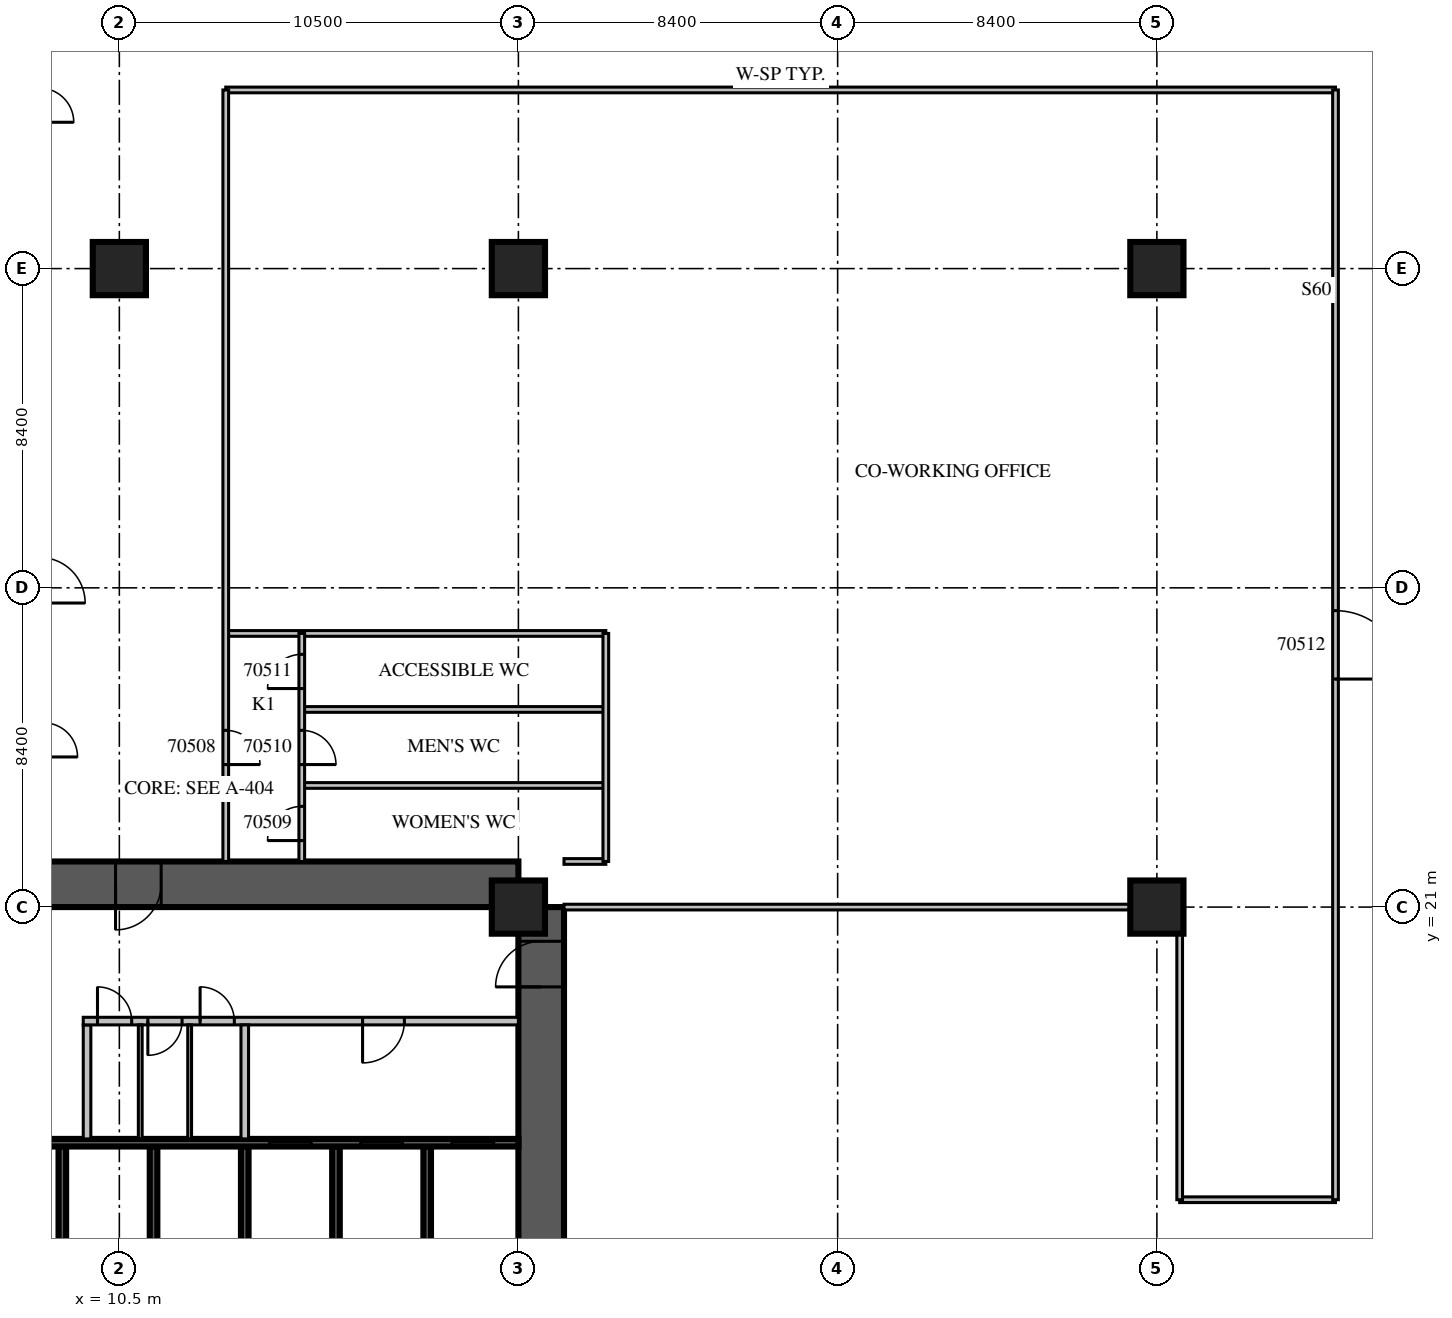
"""IFC4 building model, lengths in metres.
Left out: names, types, materials, properties, quantities, classifications, styles, units other than length and angle.
Written with IfcOpenShell. Run it as: python <this file> out.ifc"""

import sys

from ifc_helpers import new_model, si_unit, direction, frame, frame_2d, origin, origin_2d, place, context, subcontext, project, spatial, rectangle, extrude, source, transform, mapped, element, fill, save


model = new_model("IFC4")
c1 = context("Model", 3, precision=1e-05, world=origin(), true_north=direction((0.0, 1.0)))
c2 = subcontext(c1, "Body", "Model", "MODEL_VIEW")
j1 = project(units=[si_unit("LENGTHUNIT", "METRE"), si_unit("PLANEANGLEUNIT", "RADIAN")], contexts=[c1])
p1 = place(None, origin())
s1 = spatial("IfcSite", under=j1, at=p1, CompositionType="ELEMENT")
p2 = place(p1, origin())
s2 = spatial("IfcBuilding", under=s1, at=p2, CompositionType="ELEMENT")
p3 = place(p2, frame((0.0, 0.0, 12.9)))
s3 = spatial("IfcBuildingStorey", under=s2, at=p3, CompositionType="ELEMENT", Elevation=12.9)
m1 = source(origin(), c2, "Body", "SweptSolid", [
    extrude(rectangle(XDim=1.4, YDim=1.4, at=origin_2d()), origin(), (0.0, 0.0, 1.0), 5.4),
])
for number, where, z_axis, x_axis in (
    (1, (10.5, 37.8, 0.0), (0.0, 0.0, 1.0), (1.0, 0.0, 0.0)),
    (2, (21.0, 21.0, 0.0), (0.0, 0.0, 1.0), (1.0, 0.0, 0.0)),
    (3, (21.0, 37.8, 0.0), (0.0, 0.0, 1.0), (1.0, 0.0, 0.0)),
    (4, (37.8, 21.0, 0.0), (0.0, 0.0, 1.0), (1.0, 0.0, 0.0)),
    (5, (37.8, 37.8, 0.0), (0.0, 0.0, 1.0), (1.0, 0.0, 0.0)),
):
    element("IfcColumn", number, at=place(p3, frame(where, z_axis=z_axis, x_axis=x_axis)), inside=s3, PredefinedType="COLUMN", context=c2, shape_type="MappedRepresentation", body=[
        mapped(m1, transform((0.0, 0.0, 0.0), scale=1.0)),
    ])
m2 = source(origin(), c2, "Body", "SweptSolid", [
    extrude(rectangle(XDim=16.8, YDim=1.2, at=frame_2d((8.4, 0.0))), origin(), (0.0, 0.0, 1.0), 5.4),
])
p4 = place(p3, frame((21.6, 4.2, 0.0), z_axis=(0.0, 0.0, 1.0), x_axis=(0.0, 1.0, 0.0)))
e6 = element("IfcWall", 6, at=p4, inside=s3, PredefinedType="SHEAR", context=c2, shape_type="MappedRepresentation", body=[
    mapped(m2, transform((0.0, 0.0, 0.0), scale=1.0)),
])
m3 = source(origin(), c2, "Body", "SweptSolid", [
    extrude(rectangle(XDim=2.2, YDim=2.1, at=frame_2d((1.1, 1.05))), frame((0.0, 0.61, 0.0), z_axis=(0.0, -1.0, 0.0), x_axis=(1.0, 0.0, 0.0)), (0.0, 0.0, 1.0), 1.22),
])
p5 = place(p4, frame((4.2, 0.0, 0.0)))
e7 = element("IfcOpeningElement", 7, at=p5, cuts=e6, PredefinedType="OPENING", context=c2, shape_type="MappedRepresentation", body=[
    mapped(m3, transform((0.0, 0.0, 0.0), scale=1.0)),
])
m4 = source(origin(), c2, "Body", "SweptSolid", [
    extrude(rectangle(XDim=1.2, YDim=2.1, at=frame_2d((0.6, 1.05))), frame((0.0, 0.61, 0.0), z_axis=(0.0, -1.0, 0.0), x_axis=(1.0, 0.0, 0.0)), (0.0, 0.0, 1.0), 1.22),
])
p6 = place(p4, frame((14.7, 0.0, 0.0)))
e8 = element("IfcOpeningElement", 8, at=p6, cuts=e6, PredefinedType="OPENING", context=c2, shape_type="MappedRepresentation", body=[
    mapped(m4, transform((0.0, 0.0, 0.0), scale=1.0)),
])
p7 = place(p3, frame((4.2, 21.6, 0.0), z_axis=(0.0, 0.0, 1.0), x_axis=(1.0, 0.0, 0.0)))
e9 = element("IfcWall", 9, at=p7, inside=s3, PredefinedType="SHEAR", context=c2, shape_type="MappedRepresentation", body=[
    mapped(m2, transform((0.0, 0.0, 0.0), scale=1.0)),
])
p8 = place(p7, frame((6.2, 0.0, 0.0)))
e10 = element("IfcOpeningElement", 10, at=p8, cuts=e9, PredefinedType="OPENING", context=c2, shape_type="MappedRepresentation", body=[
    mapped(m4, transform((0.0, 0.0, 0.0), scale=1.0)),
])
m5 = source(origin(), c2, "Body", "SweptSolid", [
    extrude(rectangle(XDim=3.0, YDim=0.2, at=frame_2d((1.5, 0.0))), origin(), (0.0, 0.0, 1.0), 5.4),
])
for number, where, z_axis, x_axis in (
    (11, (9.0, 11.7, 0.0), (0.0, 0.0, 1.0), (0.0, 1.0, 0.0)),
    (12, (11.4, 11.7, 0.0), (0.0, 0.0, 1.0), (0.0, 1.0, 0.0)),
    (13, (13.8, 11.7, 0.0), (0.0, 0.0, 1.0), (0.0, 1.0, 0.0)),
    (14, (16.2, 11.7, 0.0), (0.0, 0.0, 1.0), (0.0, 1.0, 0.0)),
    (15, (18.6, 11.7, 0.0), (0.0, 0.0, 1.0), (0.0, 1.0, 0.0)),
):
    element("IfcWall", number, at=place(p3, frame(where, z_axis=z_axis, x_axis=x_axis)), inside=s3, PredefinedType="SOLIDWALL", context=c2, shape_type="MappedRepresentation", body=[
        mapped(m5, transform((0.0, 0.0, 0.0), scale=1.0)),
    ])
m6 = source(origin(), c2, "Body", "SweptSolid", [
    extrude(rectangle(XDim=16.8, YDim=0.2, at=frame_2d((8.4, 0.0))), origin(), (0.0, 0.0, 1.0), 5.4),
])
p9 = place(p3, frame((4.2, 14.8, 0.0), z_axis=(0.0, 0.0, 1.0), x_axis=(1.0, 0.0, 0.0)))
e16 = element("IfcWall", 16, at=p9, inside=s3, PredefinedType="SOLIDWALL", context=c2, shape_type="MappedRepresentation", body=[
    mapped(m6, transform((0.0, 0.0, 0.0), scale=1.0)),
])
m7 = source(origin(), c2, "Body", "SweptSolid", [
    extrude(rectangle(XDim=1.1, YDim=2.1, at=frame_2d((0.55, 1.05))), frame((0.0, 0.11, 0.0), z_axis=(0.0, -1.0, 0.0), x_axis=(1.0, 0.0, 0.0)), (0.0, 0.0, 1.0), 0.22),
])
p10 = place(p9, frame((10.25, 0.0, 0.0)))
e17 = element("IfcOpeningElement", 17, at=p10, cuts=e16, PredefinedType="OPENING", context=c2, shape_type="MappedRepresentation", body=[
    mapped(m7, transform((0.0, 0.0, 0.0), scale=1.0)),
])
p11 = place(p9, frame((12.65, 0.0, 0.0)))
e18 = element("IfcOpeningElement", 18, at=p11, cuts=e16, PredefinedType="OPENING", context=c2, shape_type="MappedRepresentation", body=[
    mapped(m7, transform((0.0, 0.0, 0.0), scale=1.0)),
])
p12 = place(p9, frame((15.05, 0.0, 0.0)))
e19 = element("IfcOpeningElement", 19, at=p12, cuts=e16, PredefinedType="OPENING", context=c2, shape_type="MappedRepresentation", body=[
    mapped(m7, transform((0.0, 0.0, 0.0), scale=1.0)),
])
m8 = source(origin(), c2, "Body", "SweptSolid", [
    extrude(rectangle(XDim=3.0, YDim=0.2, at=frame_2d((1.5, 0.0))), origin(), (0.0, 0.0, 1.0), 4.8),
])
p13 = place(p3, frame((9.65, 14.9, 0.0), z_axis=(0.0, 0.0, 1.0), x_axis=(0.0, 1.0, 0.0)))
e20 = element("IfcWall", 20, at=p13, inside=s3, PredefinedType="PARTITIONING", context=c2, shape_type="MappedRepresentation", body=[
    mapped(m8, transform((0.0, 0.0, 0.0), scale=1.0)),
])
m9 = source(origin(), c2, "Body", "SweptSolid", [
    extrude(rectangle(XDim=11.45, YDim=0.2, at=frame_2d((5.725, 0.0))), origin(), (0.0, 0.0, 1.0), 4.8),
])
p14 = place(p3, frame((9.55, 18.0, 0.0), z_axis=(0.0, 0.0, 1.0), x_axis=(1.0, 0.0, 0.0)))
e21 = element("IfcWall", 21, at=p14, inside=s3, PredefinedType="PARTITIONING", context=c2, shape_type="MappedRepresentation", body=[
    mapped(m9, transform((0.0, 0.0, 0.0), scale=1.0)),
])
m10 = source(origin(), c2, "Body", "SweptSolid", [
    extrude(rectangle(XDim=0.9, YDim=2.1, at=frame_2d((0.45, 1.05))), frame((0.0, 0.11, 0.0), z_axis=(0.0, -1.0, 0.0), x_axis=(1.0, 0.0, 0.0)), (0.0, 0.0, 1.0), 0.22),
])
p15 = place(p14, frame((0.375, 0.0, 0.0)))
e22 = element("IfcOpeningElement", 22, at=p15, cuts=e21, PredefinedType="OPENING", context=c2, shape_type="MappedRepresentation", body=[
    mapped(m10, transform((0.0, 0.0, 0.0), scale=1.0)),
])
p16 = place(p14, frame((1.7, 0.0, 0.0)))
e23 = element("IfcOpeningElement", 23, at=p16, cuts=e21, PredefinedType="OPENING", context=c2, shape_type="MappedRepresentation", body=[
    mapped(m10, transform((0.0, 0.0, 0.0), scale=1.0)),
])
p17 = place(p14, frame((3.075, 0.0, 0.0)))
e24 = element("IfcOpeningElement", 24, at=p17, cuts=e21, PredefinedType="OPENING", context=c2, shape_type="MappedRepresentation", body=[
    mapped(m10, transform((0.0, 0.0, 0.0), scale=1.0)),
])
p18 = place(p14, frame((7.35, 0.0, 0.0)))
e25 = element("IfcOpeningElement", 25, at=p18, cuts=e21, PredefinedType="OPENING", context=c2, shape_type="MappedRepresentation", body=[
    mapped(m7, transform((0.0, 0.0, 0.0), scale=1.0)),
])
p19 = place(p3, frame((13.8, 14.9, 0.0), z_axis=(0.0, 0.0, 1.0), x_axis=(0.0, 1.0, 0.0)))
e26 = element("IfcWall", 26, at=p19, inside=s3, PredefinedType="PARTITIONING", context=c2, shape_type="MappedRepresentation", body=[
    mapped(m8, transform((0.0, 0.0, 0.0), scale=1.0)),
])
m11 = source(origin(), c2, "Body", "SweptSolid", [
    extrude(rectangle(XDim=3.0, YDim=0.1, at=frame_2d((1.5, 0.0))), origin(), (0.0, 0.0, 1.0), 4.8),
])
for number, where, z_axis, x_axis in (
    (27, (11.05, 14.9, 0.0), (0.0, 0.0, 1.0), (0.0, 1.0, 0.0)),
    (28, (12.35, 14.9, 0.0), (0.0, 0.0, 1.0), (0.0, 1.0, 0.0)),
):
    element("IfcWall", number, at=place(p3, frame(where, z_axis=z_axis, x_axis=x_axis)), inside=s3, PredefinedType="PARTITIONING", context=c2, shape_type="MappedRepresentation", body=[
        mapped(m11, transform((0.0, 0.0, 0.0), scale=1.0)),
    ])
m12 = source(origin(), c2, "Body", "SweptSolid", [
    extrude(rectangle(XDim=4.1, YDim=0.15, at=frame_2d((2.05, 0.0))), origin(), (0.0, 0.0, 1.0), 4.8),
])
p20 = place(p3, frame((38.4, 13.3, 0.0), z_axis=(0.0, 0.0, 1.0), x_axis=(1.0, 0.0, 0.0)))
e29 = element("IfcWall", 29, at=p20, inside=s3, PredefinedType="PARTITIONING", context=c2, shape_type="MappedRepresentation", body=[
    mapped(m12, transform((0.0, 0.0, 0.0), scale=1.0)),
])
m13 = source(origin(), c2, "Body", "SweptSolid", [
    extrude(rectangle(XDim=16.2, YDim=0.15, at=frame_2d((8.1, 0.0))), origin(), (0.0, 0.0, 1.0), 4.8),
])
p21 = place(p3, frame((22.2, 21.0, 0.0), z_axis=(0.0, 0.0, 1.0), x_axis=(1.0, 0.0, 0.0)))
e30 = element("IfcWall", 30, at=p21, inside=s3, PredefinedType="PARTITIONING", context=c2, shape_type="MappedRepresentation", body=[
    mapped(m13, transform((0.0, 0.0, 0.0), scale=1.0)),
])
m14 = source(origin(), c2, "Body", "SweptSolid", [
    extrude(rectangle(XDim=1.1, YDim=0.15, at=frame_2d((0.55, 0.0))), origin(), (0.0, 0.0, 1.0), 4.8),
])
p22 = place(p3, frame((22.2, 22.2, 0.0), z_axis=(0.0, 0.0, 1.0), x_axis=(1.0, 0.0, 0.0)))
e31 = element("IfcWall", 31, at=p22, inside=s3, PredefinedType="PARTITIONING", context=c2, shape_type="MappedRepresentation", body=[
    mapped(m14, transform((0.0, 0.0, 0.0), scale=1.0)),
])
m15 = source(origin(), c2, "Body", "SweptSolid", [
    extrude(rectangle(XDim=8.0, YDim=0.15, at=frame_2d((4.0, 0.0))), origin(), (0.0, 0.0, 1.0), 4.8),
])
for number, where, z_axis, x_axis in (
    (32, (15.3, 24.2, 0.0), (0.0, 0.0, 1.0), (1.0, 0.0, 0.0)),
    (33, (15.3, 26.2, 0.0), (0.0, 0.0, 1.0), (1.0, 0.0, 0.0)),
):
    element("IfcWall", number, at=place(p3, frame(where, z_axis=z_axis, x_axis=x_axis)), inside=s3, PredefinedType="PARTITIONING", context=c2, shape_type="MappedRepresentation", body=[
        mapped(m15, transform((0.0, 0.0, 0.0), scale=1.0)),
    ])
m16 = source(origin(), c2, "Body", "SweptSolid", [
    extrude(rectangle(XDim=10.0, YDim=0.15, at=frame_2d((5.0, 0.0))), origin(), (0.0, 0.0, 1.0), 4.8),
])
p23 = place(p3, frame((13.3, 28.2, 0.0), z_axis=(0.0, 0.0, 1.0), x_axis=(1.0, 0.0, 0.0)))
e34 = element("IfcWall", 34, at=p23, inside=s3, PredefinedType="PARTITIONING", context=c2, shape_type="MappedRepresentation", body=[
    mapped(m16, transform((0.0, 0.0, 0.0), scale=1.0)),
])
m17 = source(origin(), c2, "Body", "SweptSolid", [
    extrude(rectangle(XDim=29.2, YDim=0.15, at=frame_2d((14.6, 0.0))), origin(), (0.0, 0.0, 1.0), 4.8),
])
p24 = place(p3, frame((13.3, 42.5, 0.0), z_axis=(0.0, 0.0, 1.0), x_axis=(1.0, 0.0, 0.0)))
e35 = element("IfcWall", 35, at=p24, inside=s3, PredefinedType="PARTITIONING", context=c2, shape_type="MappedRepresentation", body=[
    mapped(m17, transform((0.0, 0.0, 0.0), scale=1.0)),
])
m18 = source(origin(), c2, "Body", "SweptSolid", [
    extrude(rectangle(XDim=20.3, YDim=0.15, at=frame_2d((10.15, 0.0))), origin(), (0.0, 0.0, 1.0), 4.8),
])
p25 = place(p3, frame((13.3, 22.2, 0.0), z_axis=(0.0, 0.0, 1.0), x_axis=(0.0, 1.0, 0.0)))
e36 = element("IfcWall", 36, at=p25, inside=s3, PredefinedType="PARTITIONING", context=c2, shape_type="MappedRepresentation", body=[
    mapped(m18, transform((0.0, 0.0, 0.0), scale=1.0)),
])
m19 = source(origin(), c2, "Body", "SweptSolid", [
    extrude(rectangle(XDim=0.9, YDim=2.1, at=frame_2d((0.45, 1.05))), frame((0.0, 0.085, 0.0), z_axis=(0.0, -1.0, 0.0), x_axis=(1.0, 0.0, 0.0)), (0.0, 0.0, 1.0), 0.17),
])
p26 = place(p25, frame((2.55, 0.0, 0.0)))
e37 = element("IfcOpeningElement", 37, at=p26, cuts=e36, PredefinedType="OPENING", context=c2, shape_type="MappedRepresentation", body=[
    mapped(m19, transform((0.0, 0.0, 0.0), scale=1.0)),
])
m20 = source(origin(), c2, "Body", "SweptSolid", [
    extrude(rectangle(XDim=6.0, YDim=0.15, at=frame_2d((3.0, 0.0))), origin(), (0.0, 0.0, 1.0), 4.8),
])
p27 = place(p3, frame((15.3, 22.2, 0.0), z_axis=(0.0, 0.0, 1.0), x_axis=(0.0, 1.0, 0.0)))
e38 = element("IfcWall", 38, at=p27, inside=s3, PredefinedType="PARTITIONING", context=c2, shape_type="MappedRepresentation", body=[
    mapped(m20, transform((0.0, 0.0, 0.0), scale=1.0)),
])
p28 = place(p27, frame((0.55, 0.0, 0.0)))
e39 = element("IfcOpeningElement", 39, at=p28, cuts=e38, PredefinedType="OPENING", context=c2, shape_type="MappedRepresentation", body=[
    mapped(m19, transform((0.0, 0.0, 0.0), scale=1.0)),
])
p29 = place(p27, frame((2.55, 0.0, 0.0)))
e40 = element("IfcOpeningElement", 40, at=p29, cuts=e38, PredefinedType="OPENING", context=c2, shape_type="MappedRepresentation", body=[
    mapped(m19, transform((0.0, 0.0, 0.0), scale=1.0)),
])
p30 = place(p27, frame((4.55, 0.0, 0.0)))
e41 = element("IfcOpeningElement", 41, at=p30, cuts=e38, PredefinedType="OPENING", context=c2, shape_type="MappedRepresentation", body=[
    mapped(m19, transform((0.0, 0.0, 0.0), scale=1.0)),
])
p31 = place(p3, frame((23.3, 22.2, 0.0), z_axis=(0.0, 0.0, 1.0), x_axis=(0.0, 1.0, 0.0)))
e42 = element("IfcWall", 42, at=p31, inside=s3, PredefinedType="PARTITIONING", context=c2, shape_type="MappedRepresentation", body=[
    mapped(m20, transform((0.0, 0.0, 0.0), scale=1.0)),
])
m21 = source(origin(), c2, "Body", "SweptSolid", [
    extrude(rectangle(XDim=7.7, YDim=0.15, at=frame_2d((3.85, 0.0))), origin(), (0.0, 0.0, 1.0), 4.8),
])
p32 = place(p3, frame((38.4, 13.3, 0.0), z_axis=(0.0, 0.0, 1.0), x_axis=(0.0, 1.0, 0.0)))
e43 = element("IfcWall", 43, at=p32, inside=s3, PredefinedType="PARTITIONING", context=c2, shape_type="MappedRepresentation", body=[
    mapped(m21, transform((0.0, 0.0, 0.0), scale=1.0)),
])
p33 = place(p3, frame((42.5, 13.3, 0.0), z_axis=(0.0, 0.0, 1.0), x_axis=(0.0, 1.0, 0.0)))
e44 = element("IfcWall", 44, at=p33, inside=s3, PredefinedType="PARTITIONING", context=c2, shape_type="MappedRepresentation", body=[
    mapped(m17, transform((0.0, 0.0, 0.0), scale=1.0)),
])
m22 = source(origin(), c2, "Body", "SweptSolid", [
    extrude(rectangle(XDim=1.8, YDim=2.1, at=frame_2d((0.9, 1.05))), frame((0.0, 0.085, 0.0), z_axis=(0.0, -1.0, 0.0), x_axis=(1.0, 0.0, 0.0)), (0.0, 0.0, 1.0), 0.17),
])
p34 = place(p33, frame((13.7, 0.0, 0.0)))
e45 = element("IfcOpeningElement", 45, at=p34, cuts=e44, PredefinedType="OPENING", context=c2, shape_type="MappedRepresentation", body=[
    mapped(m22, transform((0.0, 0.0, 0.0), scale=1.0)),
])
m23 = source(origin(), c2, "Body", "SweptSolid", [
    extrude(rectangle(XDim=1.1, YDim=2.1, at=frame_2d((0.55, 1.05))), frame((0.0, 0.025, 0.0), z_axis=(0.0, -1.0, 0.0), x_axis=(1.0, 0.0, 0.0)), (0.0, 0.0, 1.0), 0.05),
])
p35 = place(p10, origin())
e46 = element("IfcDoor", 46, at=p35, inside=s3, OperationType="SLIDING_TO_LEFT", PredefinedType="DOOR", context=c2, shape_type="MappedRepresentation", body=[
    mapped(m23, transform((0.0, 0.0, 0.0), scale=1.0)),
])
fill(e17, e46)
p36 = place(p11, origin())
e47 = element("IfcDoor", 47, at=p36, inside=s3, OperationType="SLIDING_TO_LEFT", PredefinedType="DOOR", context=c2, shape_type="MappedRepresentation", body=[
    mapped(m23, transform((0.0, 0.0, 0.0), scale=1.0)),
])
fill(e18, e47)
p37 = place(p12, origin())
e48 = element("IfcDoor", 48, at=p37, inside=s3, OperationType="SLIDING_TO_LEFT", PredefinedType="DOOR", context=c2, shape_type="MappedRepresentation", body=[
    mapped(m23, transform((0.0, 0.0, 0.0), scale=1.0)),
])
fill(e19, e48)
m24 = source(origin(), c2, "Body", "SweptSolid", [
    extrude(rectangle(XDim=0.9, YDim=2.1, at=frame_2d((0.45, 1.05))), frame((0.0, 0.025, 0.0), z_axis=(0.0, -1.0, 0.0), x_axis=(1.0, 0.0, 0.0)), (0.0, 0.0, 1.0), 0.05),
])
p38 = place(p15, origin())
e49 = element("IfcDoor", 49, at=p38, inside=s3, OperationType="SINGLE_SWING_LEFT", PredefinedType="DOOR", context=c2, shape_type="MappedRepresentation", body=[
    mapped(m24, transform((0.0, 0.0, 0.0), scale=1.0)),
])
fill(e22, e49)
p39 = place(p16, origin())
e50 = element("IfcDoor", 50, at=p39, inside=s3, OperationType="SINGLE_SWING_RIGHT", PredefinedType="DOOR", context=c2, shape_type="MappedRepresentation", body=[
    mapped(m24, transform((0.0, 0.0, 0.0), scale=1.0)),
])
fill(e23, e50)
p40 = place(p17, origin())
e51 = element("IfcDoor", 51, at=p40, inside=s3, OperationType="SINGLE_SWING_LEFT", PredefinedType="DOOR", context=c2, shape_type="MappedRepresentation", body=[
    mapped(m24, transform((0.0, 0.0, 0.0), scale=1.0)),
])
fill(e24, e51)
p41 = place(p18, origin())
e52 = element("IfcDoor", 52, at=p41, inside=s3, OperationType="SINGLE_SWING_RIGHT", PredefinedType="DOOR", context=c2, shape_type="MappedRepresentation", body=[
    mapped(m23, transform((0.0, 0.0, 0.0), scale=1.0)),
])
fill(e25, e52)
m25 = source(origin(), c2, "Body", "SweptSolid", [
    extrude(rectangle(XDim=1.2, YDim=2.1, at=frame_2d((0.6, 1.05))), frame((0.0, 0.025, 0.0), z_axis=(0.0, -1.0, 0.0), x_axis=(1.0, 0.0, 0.0)), (0.0, 0.0, 1.0), 0.05),
])
p42 = place(p8, origin())
e53 = element("IfcDoor", 53, at=p42, inside=s3, OperationType="SINGLE_SWING_RIGHT", PredefinedType="DOOR", context=c2, shape_type="MappedRepresentation", body=[
    mapped(m25, transform((0.0, 0.0, 0.0), scale=1.0)),
])
fill(e10, e53)
p43 = place(p6, origin())
e54 = element("IfcDoor", 54, at=p43, inside=s3, OperationType="SINGLE_SWING_LEFT", PredefinedType="DOOR", context=c2, shape_type="MappedRepresentation", body=[
    mapped(m25, transform((0.0, 0.0, 0.0), scale=1.0)),
])
fill(e8, e54)
p44 = place(p26, origin())
e55 = element("IfcDoor", 55, at=p44, inside=s3, OperationType="SINGLE_SWING_RIGHT", PredefinedType="DOOR", context=c2, shape_type="MappedRepresentation", body=[
    mapped(m24, transform((0.0, 0.0, 0.0), scale=1.0)),
])
fill(e37, e55)
p45 = place(p28, origin())
e56 = element("IfcDoor", 56, at=p45, inside=s3, OperationType="SINGLE_SWING_LEFT", PredefinedType="DOOR", context=c2, shape_type="MappedRepresentation", body=[
    mapped(m24, transform((0.0, 0.0, 0.0), scale=1.0)),
])
fill(e39, e56)
p46 = place(p29, origin())
e57 = element("IfcDoor", 57, at=p46, inside=s3, OperationType="SINGLE_SWING_RIGHT", PredefinedType="DOOR", context=c2, shape_type="MappedRepresentation", body=[
    mapped(m24, transform((0.0, 0.0, 0.0), scale=1.0)),
])
fill(e40, e57)
p47 = place(p30, origin())
e58 = element("IfcDoor", 58, at=p47, inside=s3, OperationType="SINGLE_SWING_LEFT", PredefinedType="DOOR", context=c2, shape_type="MappedRepresentation", body=[
    mapped(m24, transform((0.0, 0.0, 0.0), scale=1.0)),
])
fill(e41, e58)
m26 = source(origin(), c2, "Body", "SweptSolid", [
    extrude(rectangle(XDim=1.8, YDim=2.1, at=frame_2d((0.9, 1.05))), frame((0.0, 0.025, 0.0), z_axis=(0.0, -1.0, 0.0), x_axis=(1.0, 0.0, 0.0)), (0.0, 0.0, 1.0), 0.05),
])
p48 = place(p34, origin())
e59 = element("IfcDoor", 59, at=p48, inside=s3, OperationType="DOUBLE_DOOR_SINGLE_SWING", PredefinedType="DOOR", context=c2, shape_type="MappedRepresentation", body=[
    mapped(m26, transform((0.0, 0.0, 0.0), scale=1.0)),
])
fill(e45, e59)
save(model, sys.argv[1])
